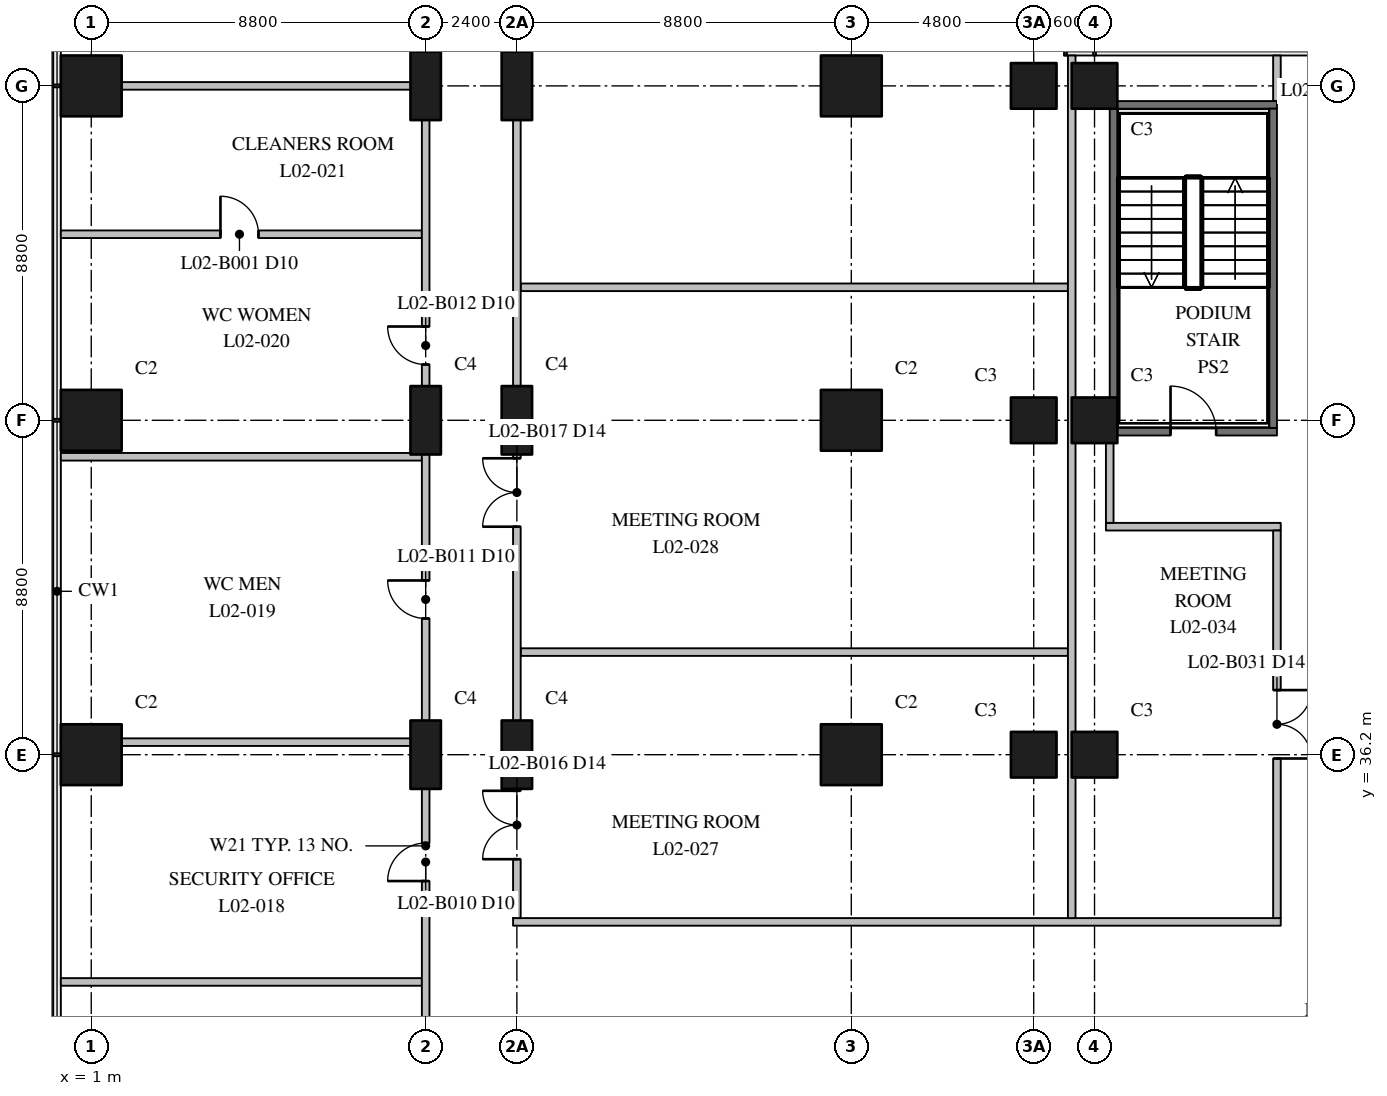
"""IFC4 building model, lengths in metres.
Left out: names, types, materials, properties, quantities, classifications, styles, units other than length and angle.
Written with IfcOpenShell. Run it as: python <this file> out.ifc"""

import sys

from ifc_helpers import new_model, si_unit, direction, frame, frame_2d, origin, origin_2d, place, context, subcontext, project, spatial, rectangle, extrude, element, fill, save


model = new_model("IFC4")
c1 = context("Model", 3, precision=1e-05, world=origin(), true_north=direction((0.0, 1.0)))
c2 = subcontext(c1, "Body", "Model", "MODEL_VIEW")
j1 = project(units=[si_unit("LENGTHUNIT", "METRE"), si_unit("PLANEANGLEUNIT", "RADIAN")], contexts=[c1])
p1 = place(None, origin())
s1 = spatial("IfcSite", under=j1, at=p1, CompositionType="ELEMENT")
p2 = place(p1, origin())
s2 = spatial("IfcBuilding", under=s1, at=p2, CompositionType="ELEMENT")
p3 = place(p2, frame((0.0, 0.0, 13.0)))
s3 = spatial("IfcBuildingStorey", under=s2, at=p3, CompositionType="ELEMENT", Elevation=13.0)
for number, where, z_axis, x_axis in (
    (1, (1.0, 36.2, 0.0), (0.0, 0.0, 1.0), (1.0, 0.0, 0.0)),
    (2, (1.0, 45.0, 0.0), (0.0, 0.0, 1.0), (1.0, 0.0, 0.0)),
    (3, (1.0, 53.8, 0.0), (0.0, 0.0, 1.0), (1.0, 0.0, 0.0)),
):
    element("IfcColumn", number, at=place(p3, frame(where, z_axis=z_axis, x_axis=x_axis)), inside=s3, PredefinedType="COLUMN", context=c2, shape_type="SweptSolid", body=[
        extrude(rectangle(XDim=1.6, YDim=1.6, at=origin_2d()), origin(), (0.0, 0.0, 1.0), 5.0),
    ])
for number, where, z_axis, x_axis in (
    (4, (9.8, 36.2, 0.0), (0.0, 0.0, 1.0), (0.0, 1.0, 0.0)),
    (5, (9.8, 45.0, 0.0), (0.0, 0.0, 1.0), (0.0, 1.0, 0.0)),
    (6, (9.8, 53.8, 0.0), (0.0, 0.0, 1.0), (0.0, 1.0, 0.0)),
    (7, (12.2, 36.2, 0.0), (0.0, 0.0, 1.0), (0.0, 1.0, 0.0)),
    (8, (12.2, 45.0, 0.0), (0.0, 0.0, 1.0), (0.0, 1.0, 0.0)),
    (9, (12.2, 53.8, 0.0), (0.0, 0.0, 1.0), (0.0, 1.0, 0.0)),
):
    element("IfcColumn", number, at=place(p3, frame(where, z_axis=z_axis, x_axis=x_axis)), inside=s3, PredefinedType="COLUMN", context=c2, shape_type="SweptSolid", body=[
        extrude(rectangle(XDim=1.8, YDim=0.8, at=origin_2d()), origin(), (0.0, 0.0, 1.0), 5.0),
    ])
for number, where, z_axis, x_axis in (
    (10, (21.0, 36.2, 0.0), (0.0, 0.0, 1.0), (1.0, 0.0, 0.0)),
    (11, (21.0, 45.0, 0.0), (0.0, 0.0, 1.0), (1.0, 0.0, 0.0)),
    (12, (21.0, 53.8, 0.0), (0.0, 0.0, 1.0), (1.0, 0.0, 0.0)),
):
    element("IfcColumn", number, at=place(p3, frame(where, z_axis=z_axis, x_axis=x_axis)), inside=s3, PredefinedType="COLUMN", context=c2, shape_type="SweptSolid", body=[
        extrude(rectangle(XDim=1.6, YDim=1.6, at=origin_2d()), origin(), (0.0, 0.0, 1.0), 5.0),
    ])
for number, where, z_axis, x_axis in (
    (13, (25.8, 36.2, 0.0), (0.0, 0.0, 1.0), (1.0, 0.0, 0.0)),
    (14, (25.8, 45.0, 0.0), (0.0, 0.0, 1.0), (1.0, 0.0, 0.0)),
    (15, (25.8, 53.8, 0.0), (0.0, 0.0, 1.0), (1.0, 0.0, 0.0)),
    (16, (27.4, 36.2, 0.0), (0.0, 0.0, 1.0), (1.0, 0.0, 0.0)),
    (17, (27.4, 45.0, 0.0), (0.0, 0.0, 1.0), (1.0, 0.0, 0.0)),
    (18, (27.4, 53.8, 0.0), (0.0, 0.0, 1.0), (1.0, 0.0, 0.0)),
):
    element("IfcColumn", number, at=place(p3, frame(where, z_axis=z_axis, x_axis=x_axis)), inside=s3, PredefinedType="COLUMN", context=c2, shape_type="SweptSolid", body=[
        extrude(rectangle(XDim=1.2, YDim=1.2, at=origin_2d()), origin(), (0.0, 0.0, 1.0), 5.0),
    ])
p4 = place(p3, frame((27.8, 44.7, 0.0), z_axis=(0.0, 0.0, 1.0), x_axis=(1.0, 0.0, 0.0)))
e19 = element("IfcWall", 19, at=p4, inside=s3, PredefinedType="SHEAR", context=c2, shape_type="SweptSolid", body=[
    extrude(rectangle(XDim=4.4, YDim=0.2, at=frame_2d((2.2, 0.0))), origin(), (0.0, 0.0, 1.0), 4.6),
])
p5 = place(p4, frame((1.6, 0.0, 0.0)))
e20 = element("IfcOpeningElement", 20, at=p5, cuts=e19, PredefinedType="OPENING", context=c2, shape_type="SweptSolid", body=[
    extrude(rectangle(XDim=1.2, YDim=2.1, at=frame_2d((0.6, 1.05))), frame((0.0, 0.11, 0.0), z_axis=(0.0, -1.0, 0.0), x_axis=(1.0, 0.0, 0.0)), (0.0, 0.0, 1.0), 0.22),
])
p6 = place(p3, frame((27.8, 53.3, 0.0), z_axis=(0.0, 0.0, 1.0), x_axis=(1.0, 0.0, 0.0)))
e21 = element("IfcWall", 21, at=p6, inside=s3, PredefinedType="SHEAR", context=c2, shape_type="SweptSolid", body=[
    extrude(rectangle(XDim=4.4, YDim=0.2, at=frame_2d((2.2, 0.0))), origin(), (0.0, 0.0, 1.0), 4.6),
])
for number, where, z_axis, x_axis in (
    (22, (27.9, 44.8, 0.0), (0.0, 0.0, 1.0), (0.0, 1.0, 0.0)),
    (23, (32.1, 44.8, 0.0), (0.0, 0.0, 1.0), (0.0, 1.0, 0.0)),
):
    element("IfcWall", number, at=place(p3, frame(where, z_axis=z_axis, x_axis=x_axis)), inside=s3, PredefinedType="SHEAR", context=c2, shape_type="SweptSolid", body=[
        extrude(rectangle(XDim=8.4, YDim=0.2, at=frame_2d((4.2, 0.0))), origin(), (0.0, 0.0, 1.0), 4.6),
    ])
p7 = place(p3, frame((12.1, 31.8, 0.0), z_axis=(0.0, 0.0, 1.0), x_axis=(1.0, 0.0, 0.0)))
e24 = element("IfcWall", 24, at=p7, inside=s3, PredefinedType="PARTITIONING", context=c2, shape_type="SweptSolid", body=[
    extrude(rectangle(XDim=20.2, YDim=0.2, at=frame_2d((10.1, 0.0))), origin(), (0.0, 0.0, 1.0), 4.6),
])
p8 = place(p3, frame((27.7, 42.2, 0.0), z_axis=(0.0, 0.0, 1.0), x_axis=(1.0, 0.0, 0.0)))
e25 = element("IfcWall", 25, at=p8, inside=s3, PredefinedType="PARTITIONING", context=c2, shape_type="SweptSolid", body=[
    extrude(rectangle(XDim=4.6, YDim=0.2, at=frame_2d((2.3, 0.0))), origin(), (0.0, 0.0, 1.0), 4.6),
])
for number, where, z_axis, x_axis in (
    (26, (0.2, 30.22, 0.0), (0.0, 0.0, 1.0), (1.0, 0.0, 0.0)),
    (27, (0.2, 36.53, 0.0), (0.0, 0.0, 1.0), (1.0, 0.0, 0.0)),
    (28, (0.2, 44.04, 0.0), (0.0, 0.0, 1.0), (1.0, 0.0, 0.0)),
):
    element("IfcWall", number, at=place(p3, frame(where, z_axis=z_axis, x_axis=x_axis)), inside=s3, PredefinedType="PARTITIONING", context=c2, shape_type="SweptSolid", body=[
        extrude(rectangle(XDim=9.5, YDim=0.2, at=frame_2d((4.75, 0.0))), origin(), (0.0, 0.0, 1.0), 4.6),
    ])
p9 = place(p3, frame((0.2, 49.896, 0.0), z_axis=(0.0, 0.0, 1.0), x_axis=(1.0, 0.0, 0.0)))
e29 = element("IfcWall", 29, at=p9, inside=s3, PredefinedType="PARTITIONING", context=c2, shape_type="SweptSolid", body=[
    extrude(rectangle(XDim=9.5, YDim=0.2, at=frame_2d((4.75, 0.0))), origin(), (0.0, 0.0, 1.0), 4.6),
])
p10 = place(p9, frame((4.2, 0.0, 0.0)))
e30 = element("IfcOpeningElement", 30, at=p10, cuts=e29, PredefinedType="OPENING", context=c2, shape_type="SweptSolid", body=[
    extrude(rectangle(XDim=1.0, YDim=2.1, at=frame_2d((0.5, 1.05))), frame((0.0, 0.11, 0.0), z_axis=(0.0, -1.0, 0.0), x_axis=(1.0, 0.0, 0.0)), (0.0, 0.0, 1.0), 0.22),
])
p11 = place(p3, frame((0.2, 53.8, 0.0), z_axis=(0.0, 0.0, 1.0), x_axis=(1.0, 0.0, 0.0)))
e31 = element("IfcWall", 31, at=p11, inside=s3, PredefinedType="PARTITIONING", context=c2, shape_type="SweptSolid", body=[
    extrude(rectangle(XDim=9.5, YDim=0.2, at=frame_2d((4.75, 0.0))), origin(), (0.0, 0.0, 1.0), 4.6),
])
for number, where, z_axis, x_axis in (
    (32, (12.3, 38.9, 0.0), (0.0, 0.0, 1.0), (1.0, 0.0, 0.0)),
    (33, (12.3, 48.5, 0.0), (0.0, 0.0, 1.0), (1.0, 0.0, 0.0)),
):
    element("IfcWall", number, at=place(p3, frame(where, z_axis=z_axis, x_axis=x_axis)), inside=s3, PredefinedType="PARTITIONING", context=c2, shape_type="SweptSolid", body=[
        extrude(rectangle(XDim=14.4, YDim=0.2, at=frame_2d((7.2, 0.0))), origin(), (0.0, 0.0, 1.0), 4.6),
    ])
p12 = place(p3, frame((9.8, 9.8, 0.0), z_axis=(0.0, 0.0, 1.0), x_axis=(0.0, 1.0, 0.0)))
e34 = element("IfcWall", 34, at=p12, inside=s3, PredefinedType="PARTITIONING", context=c2, shape_type="SweptSolid", body=[
    extrude(rectangle(XDim=48.0, YDim=0.2, at=frame_2d((24.0, 0.0))), origin(), (0.0, 0.0, 1.0), 4.6),
])
p13 = place(p12, frame((5.73, 0.0, 0.0)))
e35 = element("IfcOpeningElement", 35, at=p13, cuts=e34, PredefinedType="OPENING", context=c2, shape_type="SweptSolid", body=[
    extrude(rectangle(XDim=1.0, YDim=2.1, at=frame_2d((0.5, 1.05))), frame((0.0, 0.11, 0.0), z_axis=(0.0, -1.0, 0.0), x_axis=(1.0, 0.0, 0.0)), (0.0, 0.0, 1.0), 0.22),
])
p14 = place(p12, frame((14.74, 0.0, 0.0)))
e36 = element("IfcOpeningElement", 36, at=p14, cuts=e34, PredefinedType="OPENING", context=c2, shape_type="SweptSolid", body=[
    extrude(rectangle(XDim=1.0, YDim=2.1, at=frame_2d((0.5, 1.05))), frame((0.0, 0.11, 0.0), z_axis=(0.0, -1.0, 0.0), x_axis=(1.0, 0.0, 0.0)), (0.0, 0.0, 1.0), 0.22),
])
p15 = place(p12, frame((23.075, 0.0, 0.0)))
e37 = element("IfcOpeningElement", 37, at=p15, cuts=e34, PredefinedType="OPENING", context=c2, shape_type="SweptSolid", body=[
    extrude(rectangle(XDim=1.0, YDim=2.1, at=frame_2d((0.5, 1.05))), frame((0.0, 0.11, 0.0), z_axis=(0.0, -1.0, 0.0), x_axis=(1.0, 0.0, 0.0)), (0.0, 0.0, 1.0), 0.22),
])
p16 = place(p12, frame((29.985, 0.0, 0.0)))
e38 = element("IfcOpeningElement", 38, at=p16, cuts=e34, PredefinedType="OPENING", context=c2, shape_type="SweptSolid", body=[
    extrude(rectangle(XDim=1.0, YDim=2.1, at=frame_2d((0.5, 1.05))), frame((0.0, 0.11, 0.0), z_axis=(0.0, -1.0, 0.0), x_axis=(1.0, 0.0, 0.0)), (0.0, 0.0, 1.0), 0.22),
])
p17 = place(p12, frame((36.668, 0.0, 0.0)))
e39 = element("IfcOpeningElement", 39, at=p17, cuts=e34, PredefinedType="OPENING", context=c2, shape_type="SweptSolid", body=[
    extrude(rectangle(XDim=1.0, YDim=2.1, at=frame_2d((0.5, 1.05))), frame((0.0, 0.11, 0.0), z_axis=(0.0, -1.0, 0.0), x_axis=(1.0, 0.0, 0.0)), (0.0, 0.0, 1.0), 0.22),
])
p18 = place(p12, frame((44.967, 0.0, 0.0)))
e40 = element("IfcOpeningElement", 40, at=p18, cuts=e34, PredefinedType="OPENING", context=c2, shape_type="SweptSolid", body=[
    extrude(rectangle(XDim=1.0, YDim=2.1, at=frame_2d((0.5, 1.05))), frame((0.0, 0.11, 0.0), z_axis=(0.0, -1.0, 0.0), x_axis=(1.0, 0.0, 0.0)), (0.0, 0.0, 1.0), 0.22),
])
p19 = place(p12, frame((0.4, 0.0, 0.0)))
e41 = element("IfcOpeningElement", 41, at=p19, cuts=e34, PredefinedType="OPENING", context=c2, shape_type="SweptSolid", body=[
    extrude(rectangle(XDim=1.0, YDim=2.1, at=frame_2d((0.5, 1.05))), frame((0.0, 0.11, 0.0), z_axis=(0.0, -1.0, 0.0), x_axis=(1.0, 0.0, 0.0)), (0.0, 0.0, 1.0), 0.22),
])
p20 = place(p3, frame((12.2, 31.9, 0.0), z_axis=(0.0, 0.0, 1.0), x_axis=(0.0, 1.0, 0.0)))
e42 = element("IfcWall", 42, at=p20, inside=s3, PredefinedType="PARTITIONING", context=c2, shape_type="SweptSolid", body=[
    extrude(rectangle(XDim=46.3, YDim=0.2, at=frame_2d((23.15, 0.0))), origin(), (0.0, 0.0, 1.0), 4.6),
])
p21 = place(p20, frame((1.55, 0.0, 0.0)))
e43 = element("IfcOpeningElement", 43, at=p21, cuts=e42, PredefinedType="OPENING", context=c2, shape_type="SweptSolid", body=[
    extrude(rectangle(XDim=1.8, YDim=2.4, at=frame_2d((0.9, 1.2))), frame((0.0, 0.11, 0.0), z_axis=(0.0, -1.0, 0.0), x_axis=(1.0, 0.0, 0.0)), (0.0, 0.0, 1.0), 0.22),
])
p22 = place(p20, frame((10.3, 0.0, 0.0)))
e44 = element("IfcOpeningElement", 44, at=p22, cuts=e42, PredefinedType="OPENING", context=c2, shape_type="SweptSolid", body=[
    extrude(rectangle(XDim=1.8, YDim=2.4, at=frame_2d((0.9, 1.2))), frame((0.0, 0.11, 0.0), z_axis=(0.0, -1.0, 0.0), x_axis=(1.0, 0.0, 0.0)), (0.0, 0.0, 1.0), 0.22),
])
p23 = place(p20, frame((25.725, 0.0, 0.0)))
e45 = element("IfcOpeningElement", 45, at=p23, cuts=e42, PredefinedType="OPENING", context=c2, shape_type="SweptSolid", body=[
    extrude(rectangle(XDim=1.8, YDim=2.4, at=frame_2d((0.9, 1.2))), frame((0.0, 0.11, 0.0), z_axis=(0.0, -1.0, 0.0), x_axis=(1.0, 0.0, 0.0)), (0.0, 0.0, 1.0), 0.22),
])
p24 = place(p20, frame((35.6, 0.0, 0.0)))
e46 = element("IfcOpeningElement", 46, at=p24, cuts=e42, PredefinedType="OPENING", context=c2, shape_type="SweptSolid", body=[
    extrude(rectangle(XDim=1.8, YDim=2.4, at=frame_2d((0.9, 1.2))), frame((0.0, 0.11, 0.0), z_axis=(0.0, -1.0, 0.0), x_axis=(1.0, 0.0, 0.0)), (0.0, 0.0, 1.0), 0.22),
])
p25 = place(p20, frame((43.35, 0.0, 0.0)))
e47 = element("IfcOpeningElement", 47, at=p25, cuts=e42, PredefinedType="OPENING", context=c2, shape_type="SweptSolid", body=[
    extrude(rectangle(XDim=1.8, YDim=2.1, at=frame_2d((0.9, 1.05))), frame((0.0, 0.11, 0.0), z_axis=(0.0, -1.0, 0.0), x_axis=(1.0, 0.0, 0.0)), (0.0, 0.0, 1.0), 0.22),
])
p26 = place(p3, frame((32.2, 31.9, 0.0), z_axis=(0.0, 0.0, 1.0), x_axis=(0.0, 1.0, 0.0)))
e48 = element("IfcWall", 48, at=p26, inside=s3, PredefinedType="PARTITIONING", context=c2, shape_type="SweptSolid", body=[
    extrude(rectangle(XDim=10.2, YDim=0.2, at=frame_2d((5.1, 0.0))), origin(), (0.0, 0.0, 1.0), 4.6),
])
p27 = place(p26, frame((4.2, 0.0, 0.0)))
e49 = element("IfcOpeningElement", 49, at=p27, cuts=e48, PredefinedType="OPENING", context=c2, shape_type="SweptSolid", body=[
    extrude(rectangle(XDim=1.8, YDim=2.4, at=frame_2d((0.9, 1.2))), frame((0.0, 0.11, 0.0), z_axis=(0.0, -1.0, 0.0), x_axis=(1.0, 0.0, 0.0)), (0.0, 0.0, 1.0), 0.22),
])
p28 = place(p3, frame((32.2, 53.4, 0.0), z_axis=(0.0, 0.0, 1.0), x_axis=(0.0, 1.0, 0.0)))
e50 = element("IfcWall", 50, at=p28, inside=s3, PredefinedType="PARTITIONING", context=c2, shape_type="SweptSolid", body=[
    extrude(rectangle(XDim=1.2, YDim=0.2, at=frame_2d((0.6, 0.0))), origin(), (0.0, 0.0, 1.0), 4.6),
])
p29 = place(p3, frame((27.8, 42.3, 0.0), z_axis=(0.0, 0.0, 1.0), x_axis=(0.0, 1.0, 0.0)))
e51 = element("IfcWall", 51, at=p29, inside=s3, PredefinedType="PARTITIONING", context=c2, shape_type="SweptSolid", body=[
    extrude(rectangle(XDim=2.3, YDim=0.2, at=frame_2d((1.15, 0.0))), origin(), (0.0, 0.0, 1.0), 4.6),
])
p30 = place(p3, frame((26.8, 31.9, 0.0), z_axis=(0.0, 0.0, 1.0), x_axis=(0.0, 1.0, 0.0)))
e52 = element("IfcWall", 52, at=p30, inside=s3, PredefinedType="PARTITIONING", context=c2, shape_type="SweptSolid", body=[
    extrude(rectangle(XDim=22.7, YDim=0.2, at=frame_2d((11.35, 0.0))), origin(), (0.0, 0.0, 1.0), 4.6),
])
p31 = place(p5, origin())
e53 = element("IfcDoor", 53, at=p31, inside=s3, OperationType="SINGLE_SWING_LEFT", PredefinedType="DOOR", context=c2, shape_type="SweptSolid", body=[
    extrude(rectangle(XDim=1.2, YDim=2.1, at=frame_2d((0.6, 1.05))), frame((0.0, 0.025, 0.0), z_axis=(0.0, -1.0, 0.0), x_axis=(1.0, 0.0, 0.0)), (0.0, 0.0, 1.0), 0.05),
])
fill(e20, e53)
p32 = place(p10, origin())
e54 = element("IfcDoor", 54, at=p32, inside=s3, OperationType="SINGLE_SWING_LEFT", PredefinedType="DOOR", context=c2, shape_type="SweptSolid", body=[
    extrude(rectangle(XDim=1.0, YDim=2.1, at=frame_2d((0.5, 1.05))), frame((0.0, 0.025, 0.0), z_axis=(0.0, -1.0, 0.0), x_axis=(1.0, 0.0, 0.0)), (0.0, 0.0, 1.0), 0.05),
])
fill(e30, e54)
p33 = place(p15, origin())
e55 = element("IfcDoor", 55, at=p33, inside=s3, OperationType="SINGLE_SWING_LEFT", PredefinedType="DOOR", context=c2, shape_type="SweptSolid", body=[
    extrude(rectangle(XDim=1.0, YDim=2.1, at=frame_2d((0.5, 1.05))), frame((0.0, 0.025, 0.0), z_axis=(0.0, -1.0, 0.0), x_axis=(1.0, 0.0, 0.0)), (0.0, 0.0, 1.0), 0.05),
])
fill(e37, e55)
p34 = place(p16, origin())
e56 = element("IfcDoor", 56, at=p34, inside=s3, OperationType="SINGLE_SWING_RIGHT", PredefinedType="DOOR", context=c2, shape_type="SweptSolid", body=[
    extrude(rectangle(XDim=1.0, YDim=2.1, at=frame_2d((0.5, 1.05))), frame((0.0, 0.025, 0.0), z_axis=(0.0, -1.0, 0.0), x_axis=(1.0, 0.0, 0.0)), (0.0, 0.0, 1.0), 0.05),
])
fill(e38, e56)
p35 = place(p17, origin())
e57 = element("IfcDoor", 57, at=p35, inside=s3, OperationType="SINGLE_SWING_RIGHT", PredefinedType="DOOR", context=c2, shape_type="SweptSolid", body=[
    extrude(rectangle(XDim=1.0, YDim=2.1, at=frame_2d((0.5, 1.05))), frame((0.0, 0.025, 0.0), z_axis=(0.0, -1.0, 0.0), x_axis=(1.0, 0.0, 0.0)), (0.0, 0.0, 1.0), 0.05),
])
fill(e39, e57)
p36 = place(p21, origin())
e58 = element("IfcDoor", 58, at=p36, inside=s3, OperationType="DOUBLE_DOOR_SINGLE_SWING", PredefinedType="DOOR", context=c2, shape_type="SweptSolid", body=[
    extrude(rectangle(XDim=1.8, YDim=2.4, at=frame_2d((0.9, 1.2))), frame((0.0, 0.025, 0.0), z_axis=(0.0, -1.0, 0.0), x_axis=(1.0, 0.0, 0.0)), (0.0, 0.0, 1.0), 0.05),
])
fill(e43, e58)
p37 = place(p22, origin())
e59 = element("IfcDoor", 59, at=p37, inside=s3, OperationType="DOUBLE_DOOR_SINGLE_SWING", PredefinedType="DOOR", context=c2, shape_type="SweptSolid", body=[
    extrude(rectangle(XDim=1.8, YDim=2.4, at=frame_2d((0.9, 1.2))), frame((0.0, 0.025, 0.0), z_axis=(0.0, -1.0, 0.0), x_axis=(1.0, 0.0, 0.0)), (0.0, 0.0, 1.0), 0.05),
])
fill(e44, e59)
p38 = place(p27, frame((1.8, 0.0, 0.0), z_axis=(0.0, 0.0, 1.0), x_axis=(-1.0, 0.0, 0.0)))
e60 = element("IfcDoor", 60, at=p38, inside=s3, OperationType="DOUBLE_DOOR_SINGLE_SWING", PredefinedType="DOOR", context=c2, shape_type="SweptSolid", body=[
    extrude(rectangle(XDim=1.8, YDim=2.4, at=frame_2d((0.9, 1.2))), frame((0.0, 0.025, 0.0), z_axis=(0.0, -1.0, 0.0), x_axis=(1.0, 0.0, 0.0)), (0.0, 0.0, 1.0), 0.05),
])
fill(e49, e60)
save(model, sys.argv[1])
